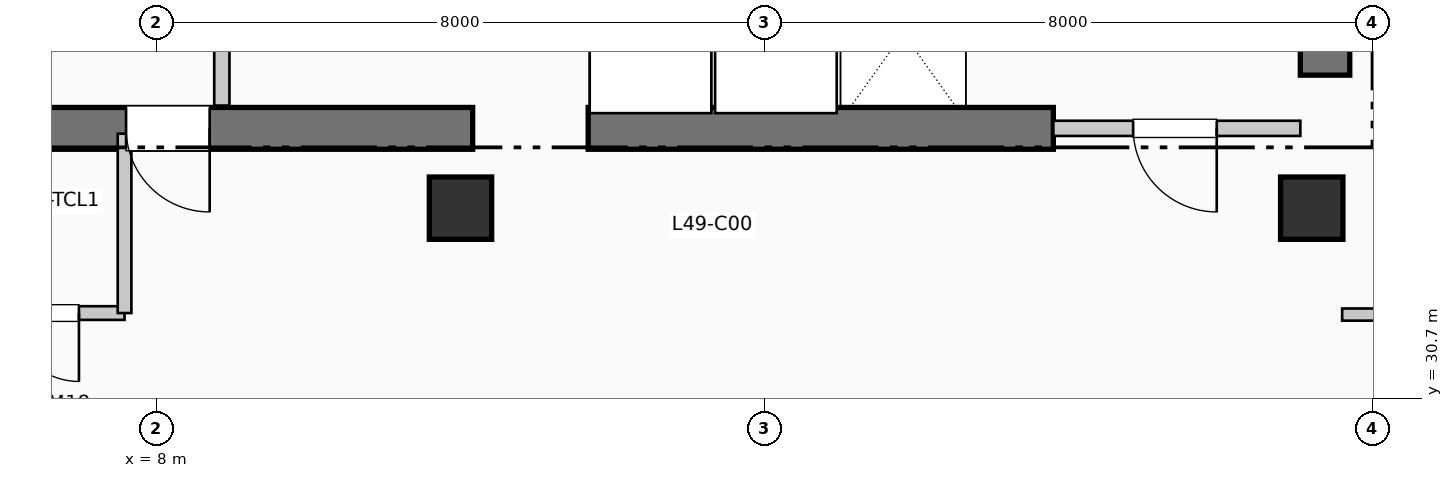
"""IFC4 building model, lengths in metres.
Left out: names, types, materials, properties, quantities, classifications, styles, units other than length and angle.
Written with IfcOpenShell. Run it as: python <this file> out.ifc"""

import sys

from ifc_helpers import new_model, si_unit, direction, frame, frame_2d, origin, origin_2d, place, context, subcontext, project, spatial, rectangle, extrude, element, fill, save


model = new_model("IFC4")
c1 = context("Model", 3, precision=1e-05, world=origin(), true_north=direction((0.0, 1.0)))
c2 = subcontext(c1, "Body", "Model", "MODEL_VIEW")
j1 = project(units=[si_unit("LENGTHUNIT", "METRE"), si_unit("PLANEANGLEUNIT", "RADIAN")], contexts=[c1])
p1 = place(None, origin())
s1 = spatial("IfcSite", under=j1, at=p1, CompositionType="ELEMENT")
p2 = place(p1, origin())
s2 = spatial("IfcBuilding", under=s1, at=p2, CompositionType="ELEMENT")
p3 = place(p2, frame((0.0, 0.0, 203.28)))
s3 = spatial("IfcBuildingStorey", under=s2, at=p3, CompositionType="ELEMENT", Elevation=203.28)
p4 = place(p3, frame((23.375, 34.95, 0.0), z_axis=(0.0, 0.0, 1.0), x_axis=(0.0, 1.0, 0.0)))
e1 = element("IfcWall", 1, at=p4, inside=s3, PredefinedType="SHEAR", context=c2, shape_type="SweptSolid", body=[
    extrude(rectangle(XDim=10.64, YDim=0.65, at=frame_2d((5.32, 0.0))), origin(), (0.0, 0.0, 1.0), 3.96),
])
p5 = place(p3, frame((1.45, 34.25, 0.0), z_axis=(0.0, 0.0, 1.0), x_axis=(1.0, 0.0, 0.0)))
e2 = element("IfcWall", 2, at=p5, inside=s3, PredefinedType="SHEAR", context=c2, shape_type="SweptSolid", body=[
    extrude(rectangle(XDim=10.71, YDim=0.55, at=frame_2d((5.355, 0.0))), origin(), (0.0, 0.0, 1.0), 3.96),
])
p6 = place(p5, frame((7.25, 0.0, 0.0), z_axis=(0.0, 0.0, 1.0), x_axis=(-1.0, 0.0, 0.0)))
e3 = element("IfcOpeningElement", 3, at=p6, cuts=e2, PredefinedType="OPENING", context=c2, shape_type="SweptSolid", body=[
    extrude(rectangle(XDim=1.1, YDim=2.15, at=frame_2d((0.55, 1.075))), frame((0.0, 0.285, 0.0), z_axis=(0.0, -1.0, 0.0), x_axis=(1.0, 0.0, 0.0)), (0.0, 0.0, 1.0), 0.57),
])
p7 = place(p3, frame((13.68, 34.25, 0.0), z_axis=(0.0, 0.0, 1.0), x_axis=(1.0, 0.0, 0.0)))
e4 = element("IfcWall", 4, at=p7, inside=s3, PredefinedType="SHEAR", context=c2, shape_type="SweptSolid", body=[
    extrude(rectangle(XDim=6.12, YDim=0.55, at=frame_2d((3.06, 0.0))), origin(), (0.0, 0.0, 1.0), 3.96),
])
for number, where, z_axis, x_axis in (
    (5, (12.0, 33.2, 0.0), (0.0, 0.0, 1.0), (1.0, 0.0, 0.0)),
    (6, (23.2, 33.2, 0.0), (0.0, 0.0, 1.0), (1.0, 0.0, 0.0)),
):
    element("IfcColumn", number, at=place(p3, frame(where, z_axis=z_axis, x_axis=x_axis)), inside=s3, PredefinedType="COLUMN", context=c2, shape_type="SweptSolid", body=[
        extrude(rectangle(XDim=0.82, YDim=0.82, at=origin_2d()), origin(), (0.0, 0.0, 1.0), 3.96),
    ])
p8 = place(p3, frame((8.86, 34.55, 0.0), z_axis=(0.0, 0.0, 1.0), x_axis=(0.0, 1.0, 0.0)))
e7 = element("IfcWall", 7, at=p8, inside=s3, PredefinedType="PARTITIONING", context=c2, shape_type="SweptSolid", body=[
    extrude(rectangle(XDim=2.5, YDim=0.2, at=frame_2d((1.25, 0.0))), origin(), (0.0, 0.0, 1.0), 3.71),
])
p9 = place(p3, frame((19.8, 34.25, 0.0), z_axis=(0.0, 0.0, 1.0), x_axis=(1.0, 0.0, 0.0)))
e8 = element("IfcWall", 8, at=p9, inside=s3, PredefinedType="PARTITIONING", context=c2, shape_type="SweptSolid", body=[
    extrude(rectangle(XDim=3.25, YDim=0.2, at=frame_2d((1.625, 0.0))), origin(), (0.0, 0.0, 1.0), 3.71),
])
p10 = place(p9, frame((2.15, 0.0, 0.0), z_axis=(0.0, 0.0, 1.0), x_axis=(-1.0, 0.0, 0.0)))
e9 = element("IfcOpeningElement", 9, at=p10, cuts=e8, PredefinedType="OPENING", context=c2, shape_type="SweptSolid", body=[
    extrude(rectangle(XDim=1.1, YDim=2.15, at=frame_2d((0.55, 1.075))), frame((0.0, 0.11, 0.0), z_axis=(0.0, -1.0, 0.0), x_axis=(1.0, 0.0, 0.0)), (0.0, 0.0, 1.0), 0.22),
])
p11 = place(p3, frame((5.5, 31.82, 0.0), z_axis=(0.0, 0.0, 1.0), x_axis=(1.0, 0.0, 0.0)))
e10 = element("IfcWall", 10, at=p11, inside=s3, PredefinedType="PLUMBINGWALL", context=c2, shape_type="SweptSolid", body=[
    extrude(rectangle(XDim=2.08, YDim=0.18, at=frame_2d((1.04, 0.0))), origin(), (0.0, 0.0, 1.0), 3.71),
])
p12 = place(p11, frame((1.48, 0.0, 0.0), z_axis=(0.0, 0.0, 1.0), x_axis=(-1.0, 0.0, 0.0)))
e11 = element("IfcOpeningElement", 11, at=p12, cuts=e10, PredefinedType="OPENING", context=c2, shape_type="SweptSolid", body=[
    extrude(rectangle(XDim=0.9, YDim=2.1, at=frame_2d((0.45, 1.05))), frame((0.0, 0.1, 0.0), z_axis=(0.0, -1.0, 0.0), x_axis=(1.0, 0.0, 0.0)), (0.0, 0.0, 1.0), 0.2),
])
p13 = place(p3, frame((7.58, 31.82, 0.0), z_axis=(0.0, 0.0, 1.0), x_axis=(0.0, 1.0, 0.0)))
e12 = element("IfcWall", 12, at=p13, inside=s3, PredefinedType="PLUMBINGWALL", context=c2, shape_type="SweptSolid", body=[
    extrude(rectangle(XDim=2.36, YDim=0.18, at=frame_2d((1.18, 0.0))), origin(), (0.0, 0.0, 1.0), 3.71),
])
p14 = place(p3, frame((23.6, 31.8, 0.0), z_axis=(0.0, 0.0, 1.0), x_axis=(1.0, 0.0, 0.0)))
e13 = element("IfcWall", 13, at=p14, inside=s3, PredefinedType="PARTITIONING", context=c2, shape_type="SweptSolid", body=[
    extrude(rectangle(XDim=26.41, YDim=0.16, at=frame_2d((13.205, 0.0))), origin(), (0.0, 0.0, 1.0), 3.71),
])
p15 = place(p14, frame((3.75, 0.0, 0.0)))
e14 = element("IfcOpeningElement", 14, at=p15, cuts=e13, PredefinedType="OPENING", context=c2, shape_type="SweptSolid", body=[
    extrude(rectangle(XDim=0.95, YDim=2.15, at=frame_2d((0.475, 1.075))), frame((0.0, 0.09, 0.0), z_axis=(0.0, -1.0, 0.0), x_axis=(1.0, 0.0, 0.0)), (0.0, 0.0, 1.0), 0.18),
])
p16 = place(p14, frame((12.334, 0.0, 0.0)))
e15 = element("IfcOpeningElement", 15, at=p16, cuts=e13, PredefinedType="OPENING", context=c2, shape_type="SweptSolid", body=[
    extrude(rectangle(XDim=0.95, YDim=2.15, at=frame_2d((0.475, 1.075))), frame((0.0, 0.09, 0.0), z_axis=(0.0, -1.0, 0.0), x_axis=(1.0, 0.0, 0.0)), (0.0, 0.0, 1.0), 0.18),
])
p17 = place(p14, frame((21.313, 0.0, 0.0)))
e16 = element("IfcOpeningElement", 16, at=p17, cuts=e13, PredefinedType="OPENING", context=c2, shape_type="SweptSolid", body=[
    extrude(rectangle(XDim=0.95, YDim=2.15, at=frame_2d((0.475, 1.075))), frame((0.0, 0.09, 0.0), z_axis=(0.0, -1.0, 0.0), x_axis=(1.0, 0.0, 0.0)), (0.0, 0.0, 1.0), 0.18),
])
p18 = place(p6, origin())
e17 = element("IfcDoor", 17, at=p18, inside=s3, OperationType="SINGLE_SWING_RIGHT", PredefinedType="DOOR", context=c2, shape_type="SweptSolid", body=[
    extrude(rectangle(XDim=1.1, YDim=2.15, at=frame_2d((0.55, 1.075))), frame((0.0, 0.025, 0.0), z_axis=(0.0, -1.0, 0.0), x_axis=(1.0, 0.0, 0.0)), (0.0, 0.0, 1.0), 0.05),
])
fill(e3, e17)
p19 = place(p10, origin())
e18 = element("IfcDoor", 18, at=p19, inside=s3, OperationType="SINGLE_SWING_RIGHT", PredefinedType="DOOR", context=c2, shape_type="SweptSolid", body=[
    extrude(rectangle(XDim=1.1, YDim=2.15, at=frame_2d((0.55, 1.075))), frame((0.0, 0.025, 0.0), z_axis=(0.0, -1.0, 0.0), x_axis=(1.0, 0.0, 0.0)), (0.0, 0.0, 1.0), 0.05),
])
fill(e9, e18)
p20 = place(p12, origin())
e19 = element("IfcDoor", 19, at=p20, inside=s3, OperationType="SINGLE_SWING_RIGHT", PredefinedType="DOOR", context=c2, shape_type="SweptSolid", body=[
    extrude(rectangle(XDim=0.9, YDim=2.1, at=frame_2d((0.45, 1.05))), frame((0.0, 0.025, 0.0), z_axis=(0.0, -1.0, 0.0), x_axis=(1.0, 0.0, 0.0)), (0.0, 0.0, 1.0), 0.05),
])
fill(e11, e19)
save(model, sys.argv[1])
